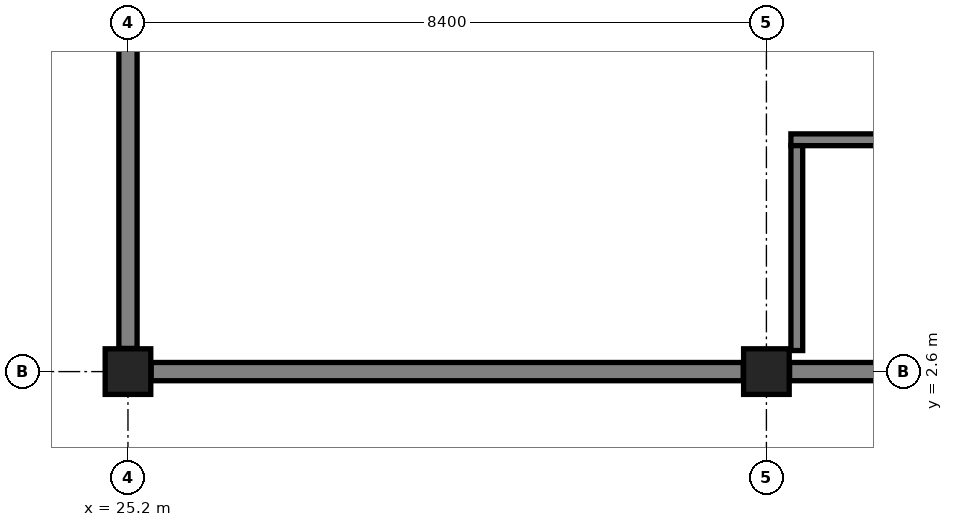
"""IFC4 building model, lengths in metres.
Left out: names, types, materials, properties, quantities, classifications, styles, units other than length and angle.
Written with IfcOpenShell. Run it as: python <this file> out.ifc"""

import sys

from ifc_helpers import new_model, si_unit, direction, frame, frame_2d, origin, origin_2d, place, context, subcontext, project, spatial, rectangle, extrude, element, fill, save


model = new_model("IFC4")
c1 = context("Model", 3, precision=1e-05, world=origin(), true_north=direction((0.0, 1.0)))
c2 = subcontext(c1, "Body", "Model", "MODEL_VIEW")
j1 = project(units=[si_unit("LENGTHUNIT", "METRE"), si_unit("PLANEANGLEUNIT", "RADIAN")], contexts=[c1])
p1 = place(None, origin())
s1 = spatial("IfcSite", under=j1, at=p1, CompositionType="ELEMENT")
p2 = place(p1, origin())
s2 = spatial("IfcBuilding", under=s1, at=p2, CompositionType="ELEMENT")
p3 = place(p2, frame((0.0, 0.0, 15.6)))
s3 = spatial("IfcBuildingStorey", under=s2, at=p3, CompositionType="ELEMENT", Elevation=15.6)
for number, where, z_axis, x_axis in (
    (1, (25.2, 2.6, 0.0), (0.0, 0.0, 1.0), (1.0, 0.0, 0.0)),
    (2, (33.6, 2.6, 0.0), (0.0, 0.0, 1.0), (1.0, 0.0, 0.0)),
):
    element("IfcColumn", number, at=place(p3, frame(where, z_axis=z_axis, x_axis=x_axis)), inside=s3, PredefinedType="COLUMN", context=c2, shape_type="SweptSolid", body=[
        extrude(rectangle(XDim=0.6, YDim=0.6, at=origin_2d()), origin(), (0.0, 0.0, 1.0), 4.5),
    ])
p4 = place(p3, frame((25.505, 2.6, 0.0), z_axis=(0.0, 0.0, 1.0), x_axis=(1.0, 0.0, 0.0)))
e3 = element("IfcWall", 3, at=p4, inside=s3, PredefinedType="STANDARD", context=c2, shape_type="SweptSolid", body=[
    extrude(rectangle(XDim=7.79, YDim=0.24, at=frame_2d((3.895, 0.0))), origin(), (0.0, 0.0, 1.0), 3.33),
])
p5 = place(p4, frame((2.72, 0.0, 0.95)))
e4 = element("IfcOpeningElement", 4, at=p5, cuts=e3, PredefinedType="OPENING", context=c2, shape_type="SweptSolid", body=[
    extrude(rectangle(XDim=2.35, YDim=1.7, at=frame_2d((1.175, 0.85))), frame((0.0, 0.13, 0.0), z_axis=(0.0, -1.0, 0.0), x_axis=(1.0, 0.0, 0.0)), (0.0, 0.0, 1.0), 0.26),
])
p6 = place(p3, frame((33.905, 2.6, 0.0), z_axis=(0.0, 0.0, 1.0), x_axis=(1.0, 0.0, 0.0)))
e5 = element("IfcWall", 5, at=p6, inside=s3, PredefinedType="STANDARD", context=c2, shape_type="SweptSolid", body=[
    extrude(rectangle(XDim=7.79, YDim=0.24, at=frame_2d((3.895, 0.0))), origin(), (0.0, 0.0, 1.0), 3.33),
])
p7 = place(p6, frame((2.445, 0.0, 0.95)))
e6 = element("IfcOpeningElement", 6, at=p7, cuts=e5, PredefinedType="OPENING", context=c2, shape_type="SweptSolid", body=[
    extrude(rectangle(XDim=2.9, YDim=1.9, at=frame_2d((1.45, 0.95))), frame((0.0, 0.13, 0.0), z_axis=(0.0, -1.0, 0.0), x_axis=(1.0, 0.0, 0.0)), (0.0, 0.0, 1.0), 0.26),
])
p8 = place(p3, frame((25.2, 11.295, 0.0), z_axis=(0.0, 0.0, 1.0), x_axis=(0.0, -1.0, 0.0)))
e7 = element("IfcWall", 7, at=p8, inside=s3, PredefinedType="STANDARD", context=c2, shape_type="SweptSolid", body=[
    extrude(rectangle(XDim=8.39, YDim=0.24, at=frame_2d((4.195, 0.0))), origin(), (0.0, 0.0, 1.0), 3.35),
])
p9 = place(p8, frame((2.845, 0.0, 0.95)))
e8 = element("IfcOpeningElement", 8, at=p9, cuts=e7, PredefinedType="OPENING", context=c2, shape_type="SweptSolid", body=[
    extrude(rectangle(XDim=2.7, YDim=2.0, at=frame_2d((1.35, 1.0))), frame((0.0, 0.13, 0.0), z_axis=(0.0, -1.0, 0.0), x_axis=(1.0, 0.0, 0.0)), (0.0, 0.0, 1.0), 0.26),
])
p10 = place(p3, frame((33.922, 5.65, 0.0), z_axis=(0.0, 0.0, 1.0), x_axis=(1.0, 0.0, 0.0)))
e9 = element("IfcWall", 9, at=p10, inside=s3, PredefinedType="PARTITIONING", context=c2, shape_type="SweptSolid", body=[
    extrude(rectangle(XDim=24.356, YDim=0.155, at=frame_2d((12.178, 0.0))), origin(), (0.0, 0.0, 1.0), 3.45),
])
p11 = place(p10, frame((11.238, 0.0, 0.0)))
e10 = element("IfcOpeningElement", 10, at=p11, cuts=e9, PredefinedType="OPENING", context=c2, shape_type="SweptSolid", body=[
    extrude(rectangle(XDim=1.88, YDim=2.42, at=frame_2d((0.94, 1.21))), frame((0.0, 0.087, 0.0), z_axis=(0.0, -1.0, 0.0), x_axis=(1.0, 0.0, 0.0)), (0.0, 0.0, 1.0), 0.175),
])
p12 = place(p10, frame((13.718, 0.0, 1.05)))
e11 = element("IfcOpeningElement", 11, at=p12, cuts=e9, PredefinedType="OPENING", context=c2, shape_type="SweptSolid", body=[
    extrude(rectangle(XDim=2.85, YDim=1.52, at=frame_2d((1.425, 0.76))), frame((0.0, 0.087, 0.0), z_axis=(0.0, -1.0, 0.0), x_axis=(1.0, 0.0, 0.0)), (0.0, 0.0, 1.0), 0.175),
])
p13 = place(p3, frame((34.0, 2.877, 0.0), z_axis=(0.0, 0.0, 1.0), x_axis=(0.0, 1.0, 0.0)))
e12 = element("IfcWall", 12, at=p13, inside=s3, PredefinedType="PARTITIONING", context=c2, shape_type="SweptSolid", body=[
    extrude(rectangle(XDim=2.696, YDim=0.155, at=frame_2d((1.348, 0.0))), origin(), (0.0, 0.0, 1.0), 3.33),
])
p14 = place(p5, origin())
e13 = element("IfcWindow", 13, at=p14, inside=s3, PartitioningType="SINGLE_PANEL", PredefinedType="WINDOW", context=c2, shape_type="SweptSolid", body=[
    extrude(rectangle(XDim=2.35, YDim=1.7, at=frame_2d((1.175, 0.85))), frame((0.0, 0.03, 0.0), z_axis=(0.0, -1.0, 0.0), x_axis=(1.0, 0.0, 0.0)), (0.0, 0.0, 1.0), 0.06),
])
fill(e4, e13)
p15 = place(p9, origin())
e14 = element("IfcWindow", 14, at=p15, inside=s3, PartitioningType="SINGLE_PANEL", PredefinedType="WINDOW", context=c2, shape_type="SweptSolid", body=[
    extrude(rectangle(XDim=2.7, YDim=2.0, at=frame_2d((1.35, 1.0))), frame((0.0, 0.03, 0.0), z_axis=(0.0, -1.0, 0.0), x_axis=(1.0, 0.0, 0.0)), (0.0, 0.0, 1.0), 0.06),
])
fill(e8, e14)
save(model, sys.argv[1])
